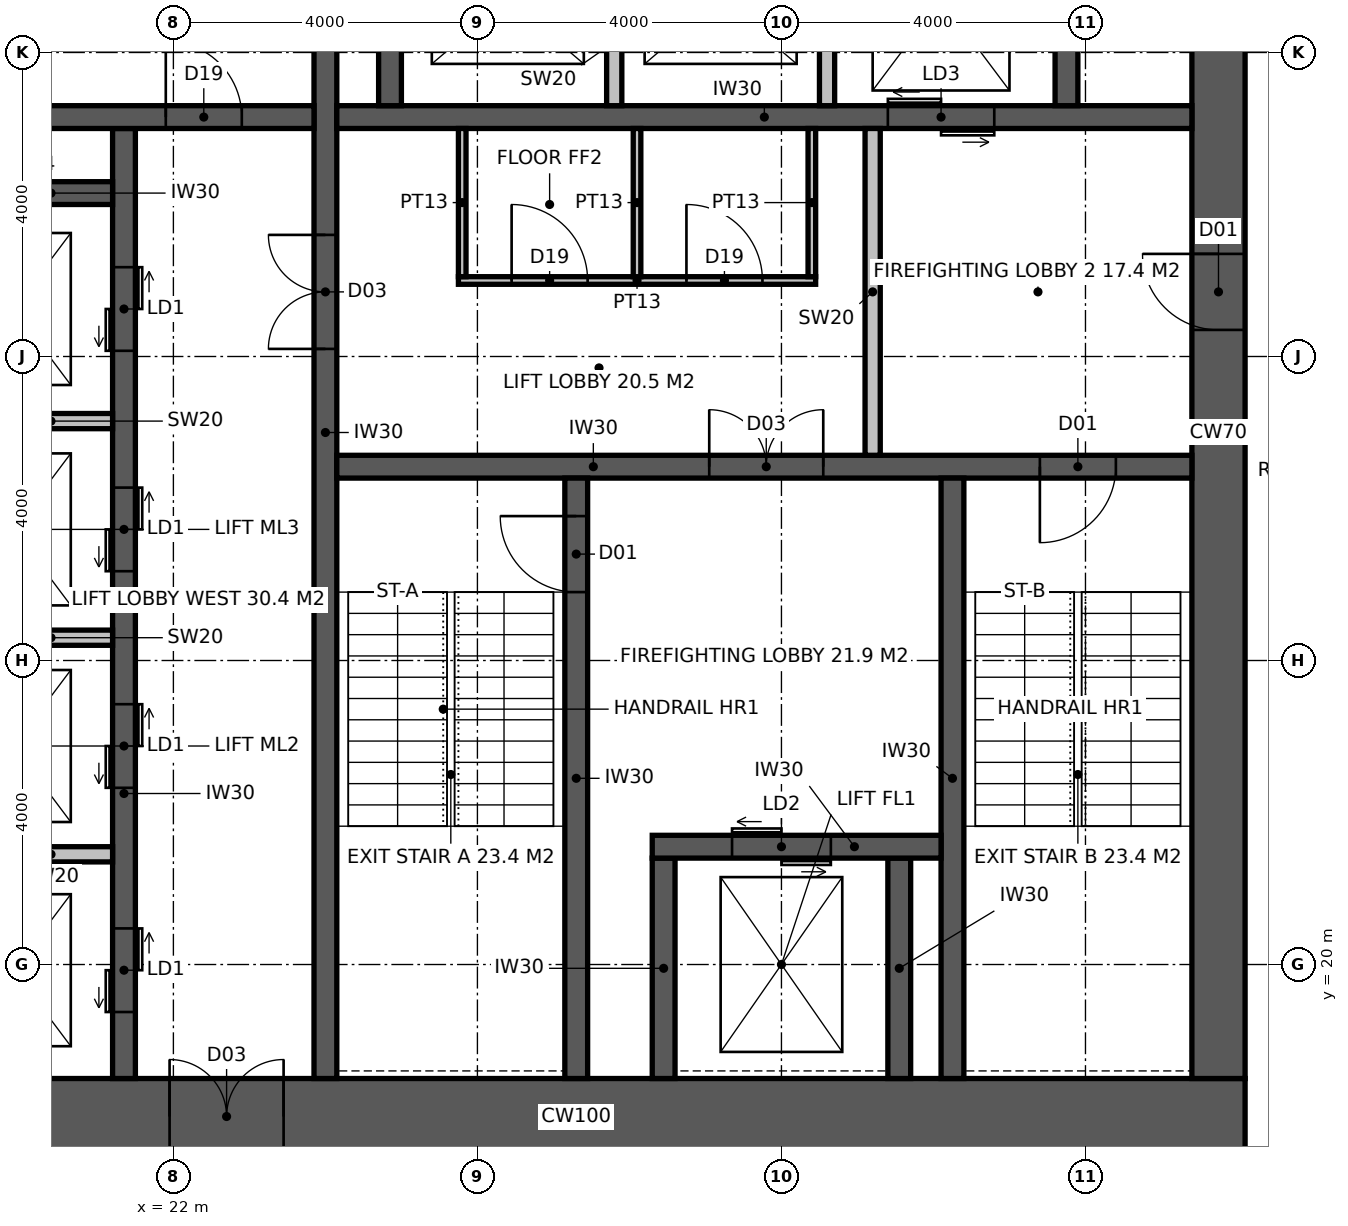
"""IFC4 building model, lengths in metres.
Left out: names, types, materials, properties, quantities, classifications, styles, units other than length and angle.
Written with IfcOpenShell. Run it as: python <this file> out.ifc"""

import sys

from ifc_helpers import new_model, si_unit, direction, frame, frame_2d, origin, place, context, subcontext, project, spatial, rectangle, extrude, element, fill, save


model = new_model("IFC4")
c1 = context("Model", 3, precision=1e-05, world=origin(), true_north=direction((0.0, 1.0)))
c2 = subcontext(c1, "Body", "Model", "MODEL_VIEW")
j1 = project(units=[si_unit("LENGTHUNIT", "METRE"), si_unit("PLANEANGLEUNIT", "RADIAN")], contexts=[c1])
p1 = place(None, origin())
s1 = spatial("IfcSite", under=j1, at=p1, CompositionType="ELEMENT")
p2 = place(p1, origin())
s2 = spatial("IfcBuilding", under=s1, at=p2, CompositionType="ELEMENT")
p3 = place(p2, frame((0.0, 0.0, 93.4)))
s3 = spatial("IfcBuildingStorey", under=s2, at=p3, CompositionType="ELEMENT", Elevation=93.4)
p4 = place(p3, frame((18.5, 18.0, -0.15), z_axis=(0.0, 0.0, 1.0), x_axis=(1.0, 0.0, 0.0)))
e1 = element("IfcWall", 1, at=p4, inside=s3, PredefinedType="SHEAR", context=c2, shape_type="SweptSolid", body=[
    extrude(rectangle(XDim=17.6, YDim=1.0, at=frame_2d((8.8, 0.0))), origin(), (0.0, 0.0, 1.0), 4.0),
])
p5 = place(p4, frame((3.45, 0.0, 0.15)))
e2 = element("IfcOpeningElement", 2, at=p5, cuts=e1, PredefinedType="OPENING", context=c2, shape_type="SweptSolid", body=[
    extrude(rectangle(XDim=1.5, YDim=2.4, at=frame_2d((0.75, 1.2))), frame((0.0, 0.51, 0.0), z_axis=(0.0, -1.0, 0.0), x_axis=(1.0, 0.0, 0.0)), (0.0, 0.0, 1.0), 1.02),
])
p6 = place(p3, frame((35.75, 18.5, -0.15), z_axis=(0.0, 0.0, 1.0), x_axis=(0.0, 1.0, 0.0)))
e3 = element("IfcWall", 3, at=p6, inside=s3, PredefinedType="SHEAR", context=c2, shape_type="SweptSolid", body=[
    extrude(rectangle(XDim=17.0, YDim=0.7, at=frame_2d((8.5, 0.0))), origin(), (0.0, 0.0, 1.0), 4.0),
])
p7 = place(p6, frame((9.85, 0.0, 0.15)))
e4 = element("IfcOpeningElement", 4, at=p7, cuts=e3, PredefinedType="OPENING", context=c2, shape_type="SweptSolid", body=[
    extrude(rectangle(XDim=1.0, YDim=2.2, at=frame_2d((0.5, 1.1))), frame((0.0, 0.36, 0.0), z_axis=(0.0, -1.0, 0.0), x_axis=(1.0, 0.0, 0.0)), (0.0, 0.0, 1.0), 0.72),
])
p8 = place(p3, frame((24.0, 18.5, -0.15), z_axis=(0.0, 0.0, 1.0), x_axis=(0.0, 1.0, 0.0)))
e5 = element("IfcWall", 5, at=p8, inside=s3, PredefinedType="SHEAR", context=c2, shape_type="SweptSolid", body=[
    extrude(rectangle(XDim=17.0, YDim=0.3, at=frame_2d((8.5, 0.0))), origin(), (0.0, 0.0, 1.0), 4.0),
])
p9 = place(p8, frame((9.6, 0.0, 0.15)))
e6 = element("IfcOpeningElement", 6, at=p9, cuts=e5, PredefinedType="OPENING", context=c2, shape_type="SweptSolid", body=[
    extrude(rectangle(XDim=1.5, YDim=2.4, at=frame_2d((0.75, 1.2))), frame((0.0, 0.16, 0.0), z_axis=(0.0, -1.0, 0.0), x_axis=(1.0, 0.0, 0.0)), (0.0, 0.0, 1.0), 0.32),
])
p10 = place(p3, frame((24.15, 26.55, -0.15), z_axis=(0.0, 0.0, 1.0), x_axis=(1.0, 0.0, 0.0)))
e7 = element("IfcWall", 7, at=p10, inside=s3, PredefinedType="SHEAR", context=c2, shape_type="SweptSolid", body=[
    extrude(rectangle(XDim=11.25, YDim=0.3, at=frame_2d((5.625, 0.0))), origin(), (0.0, 0.0, 1.0), 4.0),
])
p11 = place(p10, frame((9.25, 0.0, 0.15)))
e8 = element("IfcOpeningElement", 8, at=p11, cuts=e7, PredefinedType="OPENING", context=c2, shape_type="SweptSolid", body=[
    extrude(rectangle(XDim=1.0, YDim=2.2, at=frame_2d((0.5, 1.1))), frame((0.0, 0.16, 0.0), z_axis=(0.0, -1.0, 0.0), x_axis=(1.0, 0.0, 0.0)), (0.0, 0.0, 1.0), 0.32),
])
p12 = place(p10, frame((4.9, 0.0, 0.15)))
e9 = element("IfcOpeningElement", 9, at=p12, cuts=e7, PredefinedType="OPENING", context=c2, shape_type="SweptSolid", body=[
    extrude(rectangle(XDim=1.5, YDim=2.4, at=frame_2d((0.75, 1.2))), frame((0.0, 0.16, 0.0), z_axis=(0.0, -1.0, 0.0), x_axis=(1.0, 0.0, 0.0)), (0.0, 0.0, 1.0), 0.32),
])
p13 = place(p3, frame((27.3, 18.5, -0.15), z_axis=(0.0, 0.0, 1.0), x_axis=(0.0, 1.0, 0.0)))
e10 = element("IfcWall", 10, at=p13, inside=s3, PredefinedType="SHEAR", context=c2, shape_type="SweptSolid", body=[
    extrude(rectangle(XDim=7.9, YDim=0.3, at=frame_2d((3.95, 0.0))), origin(), (0.0, 0.0, 1.0), 4.0),
])
p14 = place(p13, frame((6.4, 0.0, 0.15)))
e11 = element("IfcOpeningElement", 11, at=p14, cuts=e10, PredefinedType="OPENING", context=c2, shape_type="SweptSolid", body=[
    extrude(rectangle(XDim=1.0, YDim=2.2, at=frame_2d((0.5, 1.1))), frame((0.0, 0.16, 0.0), z_axis=(0.0, -1.0, 0.0), x_axis=(1.0, 0.0, 0.0)), (0.0, 0.0, 1.0), 0.32),
])
p15 = place(p3, frame((32.25, 18.5, -0.15), z_axis=(0.0, 0.0, 1.0), x_axis=(0.0, 1.0, 0.0)))
e12 = element("IfcWall", 12, at=p15, inside=s3, PredefinedType="SHEAR", context=c2, shape_type="SweptSolid", body=[
    extrude(rectangle(XDim=7.9, YDim=0.3, at=frame_2d((3.95, 0.0))), origin(), (0.0, 0.0, 1.0), 4.0),
])
for number, where, z_axis, x_axis in (
    (13, (28.45, 18.5, -0.15), (0.0, 0.0, 1.0), (0.0, 1.0, 0.0)),
    (14, (31.55, 18.5, -0.15), (0.0, 0.0, 1.0), (0.0, 1.0, 0.0)),
):
    element("IfcWall", number, at=place(p3, frame(where, z_axis=z_axis, x_axis=x_axis)), inside=s3, PredefinedType="SHEAR", context=c2, shape_type="SweptSolid", body=[
        extrude(rectangle(XDim=2.9, YDim=0.3, at=frame_2d((1.45, 0.0))), origin(), (0.0, 0.0, 1.0), 4.0),
    ])
p16 = place(p3, frame((28.3, 21.55, -0.15), z_axis=(0.0, 0.0, 1.0), x_axis=(1.0, 0.0, 0.0)))
e15 = element("IfcWall", 15, at=p16, inside=s3, PredefinedType="SHEAR", context=c2, shape_type="SweptSolid", body=[
    extrude(rectangle(XDim=3.8, YDim=0.3, at=frame_2d((1.9, 0.0))), origin(), (0.0, 0.0, 1.0), 4.0),
])
p17 = place(p16, frame((1.05, 0.0, 0.15)))
e16 = element("IfcOpeningElement", 16, at=p17, cuts=e15, PredefinedType="OPENING", context=c2, shape_type="SweptSolid", body=[
    extrude(rectangle(XDim=1.3, YDim=2.4, at=frame_2d((0.65, 1.2))), frame((0.0, 0.16, 0.0), z_axis=(0.0, -1.0, 0.0), x_axis=(1.0, 0.0, 0.0)), (0.0, 0.0, 1.0), 0.32),
])
p18 = place(p3, frame((24.15, 31.15, -0.15), z_axis=(0.0, 0.0, 1.0), x_axis=(1.0, 0.0, 0.0)))
e17 = element("IfcWall", 17, at=p18, inside=s3, PredefinedType="SHEAR", context=c2, shape_type="SweptSolid", body=[
    extrude(rectangle(XDim=11.25, YDim=0.3, at=frame_2d((5.625, 0.0))), origin(), (0.0, 0.0, 1.0), 4.0),
])
p19 = place(p18, frame((7.25, 0.0, 0.15)))
e18 = element("IfcOpeningElement", 18, at=p19, cuts=e17, PredefinedType="OPENING", context=c2, shape_type="SweptSolid", body=[
    extrude(rectangle(XDim=1.4, YDim=2.4, at=frame_2d((0.7, 1.2))), frame((0.0, 0.16, 0.0), z_axis=(0.0, -1.0, 0.0), x_axis=(1.0, 0.0, 0.0)), (0.0, 0.0, 1.0), 0.32),
])
p20 = place(p3, frame((21.35, 18.5, -0.15), z_axis=(0.0, 0.0, 1.0), x_axis=(0.0, 1.0, 0.0)))
e19 = element("IfcWall", 19, at=p20, inside=s3, PredefinedType="SHEAR", context=c2, shape_type="SweptSolid", body=[
    extrude(rectangle(XDim=12.5, YDim=0.3, at=frame_2d((6.25, 0.0))), origin(), (0.0, 0.0, 1.0), 4.0),
])
p21 = place(p20, frame((0.875, 0.0, 0.15)))
e20 = element("IfcOpeningElement", 20, at=p21, cuts=e19, PredefinedType="OPENING", context=c2, shape_type="SweptSolid", body=[
    extrude(rectangle(XDim=1.1, YDim=2.2, at=frame_2d((0.55, 1.1))), frame((0.0, 0.16, 0.0), z_axis=(0.0, -1.0, 0.0), x_axis=(1.0, 0.0, 0.0)), (0.0, 0.0, 1.0), 0.32),
])
p22 = place(p20, frame((3.825, 0.0, 0.15)))
e21 = element("IfcOpeningElement", 21, at=p22, cuts=e19, PredefinedType="OPENING", context=c2, shape_type="SweptSolid", body=[
    extrude(rectangle(XDim=1.1, YDim=2.2, at=frame_2d((0.55, 1.1))), frame((0.0, 0.16, 0.0), z_axis=(0.0, -1.0, 0.0), x_axis=(1.0, 0.0, 0.0)), (0.0, 0.0, 1.0), 0.32),
])
p23 = place(p20, frame((6.675, 0.0, 0.15)))
e22 = element("IfcOpeningElement", 22, at=p23, cuts=e19, PredefinedType="OPENING", context=c2, shape_type="SweptSolid", body=[
    extrude(rectangle(XDim=1.1, YDim=2.2, at=frame_2d((0.55, 1.1))), frame((0.0, 0.16, 0.0), z_axis=(0.0, -1.0, 0.0), x_axis=(1.0, 0.0, 0.0)), (0.0, 0.0, 1.0), 0.32),
])
p24 = place(p20, frame((9.575, 0.0, 0.15)))
e23 = element("IfcOpeningElement", 23, at=p24, cuts=e19, PredefinedType="OPENING", context=c2, shape_type="SweptSolid", body=[
    extrude(rectangle(XDim=1.1, YDim=2.2, at=frame_2d((0.55, 1.1))), frame((0.0, 0.16, 0.0), z_axis=(0.0, -1.0, 0.0), x_axis=(1.0, 0.0, 0.0)), (0.0, 0.0, 1.0), 0.32),
])
p25 = place(p3, frame((18.5, 31.15, -0.15), z_axis=(0.0, 0.0, 1.0), x_axis=(1.0, 0.0, 0.0)))
e24 = element("IfcWall", 24, at=p25, inside=s3, PredefinedType="SHEAR", context=c2, shape_type="SweptSolid", body=[
    extrude(rectangle(XDim=5.35, YDim=0.3, at=frame_2d((2.675, 0.0))), origin(), (0.0, 0.0, 1.0), 4.0),
])
p26 = place(p25, frame((3.4, 0.0, 0.15)))
e25 = element("IfcOpeningElement", 25, at=p26, cuts=e24, PredefinedType="OPENING", context=c2, shape_type="SweptSolid", body=[
    extrude(rectangle(XDim=1.0, YDim=2.2, at=frame_2d((0.5, 1.1))), frame((0.0, 0.16, 0.0), z_axis=(0.0, -1.0, 0.0), x_axis=(1.0, 0.0, 0.0)), (0.0, 0.0, 1.0), 0.32),
])
p27 = place(p3, frame((18.5, 30.15, -0.15), z_axis=(0.0, 0.0, 1.0), x_axis=(1.0, 0.0, 0.0)))
e26 = element("IfcWall", 26, at=p27, inside=s3, PredefinedType="SHEAR", context=c2, shape_type="SweptSolid", body=[
    extrude(rectangle(XDim=2.7, YDim=0.3, at=frame_2d((1.35, 0.0))), origin(), (0.0, 0.0, 1.0), 4.0),
])
for number, where, z_axis, x_axis in (
    (27, (24.85, 31.3, -0.15), (0.0, 0.0, 1.0), (0.0, 1.0, 0.0)),
    (28, (33.75, 31.3, -0.15), (0.0, 0.0, 1.0), (0.0, 1.0, 0.0)),
):
    element("IfcWall", number, at=place(p3, frame(where, z_axis=z_axis, x_axis=x_axis)), inside=s3, PredefinedType="SHEAR", context=c2, shape_type="SweptSolid", body=[
        extrude(rectangle(XDim=4.2, YDim=0.3, at=frame_2d((2.1, 0.0))), origin(), (0.0, 0.0, 1.0), 4.0),
    ])
for number, where, z_axis, x_axis in (
    (29, (27.8, 31.3, -0.15), (0.0, 0.0, 1.0), (0.0, 1.0, 0.0)),
    (30, (30.6, 31.3, -0.15), (0.0, 0.0, 1.0), (0.0, 1.0, 0.0)),
):
    element("IfcWall", number, at=place(p3, frame(where, z_axis=z_axis, x_axis=x_axis)), inside=s3, PredefinedType="SOLIDWALL", context=c2, shape_type="SweptSolid", body=[
        extrude(rectangle(XDim=2.8, YDim=0.2, at=frame_2d((1.4, 0.0))), origin(), (0.0, 0.0, 1.0), 4.0),
    ])
for number, where, z_axis, x_axis in (
    (31, (18.5, 21.45, -0.15), (0.0, 0.0, 1.0), (1.0, 0.0, 0.0)),
    (32, (18.5, 24.3, -0.15), (0.0, 0.0, 1.0), (1.0, 0.0, 0.0)),
    (33, (18.5, 27.15, -0.15), (0.0, 0.0, 1.0), (1.0, 0.0, 0.0)),
):
    element("IfcWall", number, at=place(p3, frame(where, z_axis=z_axis, x_axis=x_axis)), inside=s3, PredefinedType="SOLIDWALL", context=c2, shape_type="SweptSolid", body=[
        extrude(rectangle(XDim=2.7, YDim=0.2, at=frame_2d((1.35, 0.0))), origin(), (0.0, 0.0, 1.0), 4.0),
    ])
p28 = place(p3, frame((31.2, 26.7, 0.0), z_axis=(0.0, 0.0, 1.0), x_axis=(0.0, 1.0, 0.0)))
e34 = element("IfcWall", 34, at=p28, inside=s3, PredefinedType="SOLIDWALL", context=c2, shape_type="SweptSolid", body=[
    extrude(rectangle(XDim=4.3, YDim=0.2, at=frame_2d((2.15, 0.0))), origin(), (0.0, 0.0, 1.0), 3.85),
])
p29 = place(p3, frame((25.75, 29.0, 0.0), z_axis=(0.0, 0.0, 1.0), x_axis=(1.0, 0.0, 0.0)))
e35 = element("IfcWall", 35, at=p29, inside=s3, PredefinedType="PARTITIONING", context=c2, shape_type="SweptSolid", body=[
    extrude(rectangle(XDim=4.7, YDim=0.1, at=frame_2d((2.35, 0.0))), origin(), (0.0, 0.0, 1.0), 3.85),
])
p30 = place(p29, frame((0.7, 0.0, 0.0)))
e36 = element("IfcOpeningElement", 36, at=p30, cuts=e35, PredefinedType="OPENING", context=c2, shape_type="SweptSolid", body=[
    extrude(rectangle(XDim=1.0, YDim=2.2, at=frame_2d((0.5, 1.1))), frame((0.0, 0.06, 0.0), z_axis=(0.0, -1.0, 0.0), x_axis=(1.0, 0.0, 0.0)), (0.0, 0.0, 1.0), 0.12),
])
p31 = place(p29, frame((3.0, 0.0, 0.0)))
e37 = element("IfcOpeningElement", 37, at=p31, cuts=e35, PredefinedType="OPENING", context=c2, shape_type="SweptSolid", body=[
    extrude(rectangle(XDim=1.0, YDim=2.2, at=frame_2d((0.5, 1.1))), frame((0.0, 0.06, 0.0), z_axis=(0.0, -1.0, 0.0), x_axis=(1.0, 0.0, 0.0)), (0.0, 0.0, 1.0), 0.12),
])
for number, where, z_axis, x_axis in (
    (38, (25.8, 29.05, 0.0), (0.0, 0.0, 1.0), (0.0, 1.0, 0.0)),
    (39, (30.4, 29.05, 0.0), (0.0, 0.0, 1.0), (0.0, 1.0, 0.0)),
    (40, (28.1, 29.05, 0.0), (0.0, 0.0, 1.0), (0.0, 1.0, 0.0)),
):
    element("IfcWall", number, at=place(p3, frame(where, z_axis=z_axis, x_axis=x_axis)), inside=s3, PredefinedType="PARTITIONING", context=c2, shape_type="SweptSolid", body=[
        extrude(rectangle(XDim=1.95, YDim=0.1, at=frame_2d((0.975, 0.0))), origin(), (0.0, 0.0, 1.0), 3.85),
    ])
p32 = place(p14, origin())
e41 = element("IfcDoor", 41, at=p32, inside=s3, OperationType="SINGLE_SWING_RIGHT", PredefinedType="DOOR", context=c2, shape_type="SweptSolid", body=[
    extrude(rectangle(XDim=1.0, YDim=2.2, at=frame_2d((0.5, 1.1))), frame((0.0, 0.025, 0.0), z_axis=(0.0, -1.0, 0.0), x_axis=(1.0, 0.0, 0.0)), (0.0, 0.0, 1.0), 0.05),
])
fill(e11, e41)
p33 = place(p11, frame((1.0, 0.0, 0.0), z_axis=(0.0, 0.0, 1.0), x_axis=(-1.0, 0.0, 0.0)))
e42 = element("IfcDoor", 42, at=p33, inside=s3, OperationType="SINGLE_SWING_RIGHT", PredefinedType="DOOR", context=c2, shape_type="SweptSolid", body=[
    extrude(rectangle(XDim=1.0, YDim=2.2, at=frame_2d((0.5, 1.1))), frame((0.0, 0.025, 0.0), z_axis=(0.0, -1.0, 0.0), x_axis=(1.0, 0.0, 0.0)), (0.0, 0.0, 1.0), 0.05),
])
fill(e8, e42)
p34 = place(p7, origin())
e43 = element("IfcDoor", 43, at=p34, inside=s3, OperationType="SINGLE_SWING_RIGHT", PredefinedType="DOOR", context=c2, shape_type="SweptSolid", body=[
    extrude(rectangle(XDim=1.0, YDim=2.2, at=frame_2d((0.5, 1.1))), frame((0.0, 0.025, 0.0), z_axis=(0.0, -1.0, 0.0), x_axis=(1.0, 0.0, 0.0)), (0.0, 0.0, 1.0), 0.05),
])
fill(e4, e43)
p35 = place(p12, origin())
e44 = element("IfcDoor", 44, at=p35, inside=s3, OperationType="DOUBLE_DOOR_DOUBLE_SWING", PredefinedType="DOOR", context=c2, shape_type="SweptSolid", body=[
    extrude(rectangle(XDim=1.5, YDim=2.4, at=frame_2d((0.75, 1.2))), frame((0.0, 0.025, 0.0), z_axis=(0.0, -1.0, 0.0), x_axis=(1.0, 0.0, 0.0)), (0.0, 0.0, 1.0), 0.05),
])
fill(e9, e44)
p36 = place(p9, origin())
e45 = element("IfcDoor", 45, at=p36, inside=s3, OperationType="DOUBLE_DOOR_DOUBLE_SWING", PredefinedType="DOOR", context=c2, shape_type="SweptSolid", body=[
    extrude(rectangle(XDim=1.5, YDim=2.4, at=frame_2d((0.75, 1.2))), frame((0.0, 0.025, 0.0), z_axis=(0.0, -1.0, 0.0), x_axis=(1.0, 0.0, 0.0)), (0.0, 0.0, 1.0), 0.05),
])
fill(e6, e45)
p37 = place(p26, origin())
e46 = element("IfcDoor", 46, at=p37, inside=s3, OperationType="SINGLE_SWING_LEFT", PredefinedType="DOOR", context=c2, shape_type="SweptSolid", body=[
    extrude(rectangle(XDim=1.0, YDim=2.2, at=frame_2d((0.5, 1.1))), frame((0.0, 0.025, 0.0), z_axis=(0.0, -1.0, 0.0), x_axis=(1.0, 0.0, 0.0)), (0.0, 0.0, 1.0), 0.05),
])
fill(e25, e46)
p38 = place(p30, origin())
e47 = element("IfcDoor", 47, at=p38, inside=s3, OperationType="SINGLE_SWING_LEFT", PredefinedType="DOOR", context=c2, shape_type="SweptSolid", body=[
    extrude(rectangle(XDim=1.0, YDim=2.2, at=frame_2d((0.5, 1.1))), frame((0.0, 0.025, 0.0), z_axis=(0.0, -1.0, 0.0), x_axis=(1.0, 0.0, 0.0)), (0.0, 0.0, 1.0), 0.05),
])
fill(e36, e47)
p39 = place(p31, origin())
e48 = element("IfcDoor", 48, at=p39, inside=s3, OperationType="SINGLE_SWING_LEFT", PredefinedType="DOOR", context=c2, shape_type="SweptSolid", body=[
    extrude(rectangle(XDim=1.0, YDim=2.2, at=frame_2d((0.5, 1.1))), frame((0.0, 0.025, 0.0), z_axis=(0.0, -1.0, 0.0), x_axis=(1.0, 0.0, 0.0)), (0.0, 0.0, 1.0), 0.05),
])
fill(e37, e48)
p40 = place(p5, origin())
e49 = element("IfcDoor", 49, at=p40, inside=s3, OperationType="DOUBLE_DOOR_DOUBLE_SWING", PredefinedType="DOOR", context=c2, shape_type="SweptSolid", body=[
    extrude(rectangle(XDim=1.5, YDim=2.4, at=frame_2d((0.75, 1.2))), frame((0.0, 0.025, 0.0), z_axis=(0.0, -1.0, 0.0), x_axis=(1.0, 0.0, 0.0)), (0.0, 0.0, 1.0), 0.05),
])
fill(e2, e49)
p41 = place(p17, origin())
e50 = element("IfcDoor", 50, at=p41, inside=s3, OperationType="DOUBLE_DOOR_SLIDING", PredefinedType="DOOR", context=c2, shape_type="SweptSolid", body=[
    extrude(rectangle(XDim=1.3, YDim=2.4, at=frame_2d((0.65, 1.2))), frame((0.0, 0.025, 0.0), z_axis=(0.0, -1.0, 0.0), x_axis=(1.0, 0.0, 0.0)), (0.0, 0.0, 1.0), 0.05),
])
fill(e16, e50)
p42 = place(p19, origin())
e51 = element("IfcDoor", 51, at=p42, inside=s3, OperationType="DOUBLE_DOOR_SLIDING", PredefinedType="DOOR", context=c2, shape_type="SweptSolid", body=[
    extrude(rectangle(XDim=1.4, YDim=2.4, at=frame_2d((0.7, 1.2))), frame((0.0, 0.025, 0.0), z_axis=(0.0, -1.0, 0.0), x_axis=(1.0, 0.0, 0.0)), (0.0, 0.0, 1.0), 0.05),
])
fill(e18, e51)
p43 = place(p21, origin())
e52 = element("IfcDoor", 52, at=p43, inside=s3, OperationType="DOUBLE_DOOR_SLIDING", PredefinedType="DOOR", context=c2, shape_type="SweptSolid", body=[
    extrude(rectangle(XDim=1.1, YDim=2.2, at=frame_2d((0.55, 1.1))), frame((0.0, 0.025, 0.0), z_axis=(0.0, -1.0, 0.0), x_axis=(1.0, 0.0, 0.0)), (0.0, 0.0, 1.0), 0.05),
])
fill(e20, e52)
p44 = place(p22, origin())
e53 = element("IfcDoor", 53, at=p44, inside=s3, OperationType="DOUBLE_DOOR_SLIDING", PredefinedType="DOOR", context=c2, shape_type="SweptSolid", body=[
    extrude(rectangle(XDim=1.1, YDim=2.2, at=frame_2d((0.55, 1.1))), frame((0.0, 0.025, 0.0), z_axis=(0.0, -1.0, 0.0), x_axis=(1.0, 0.0, 0.0)), (0.0, 0.0, 1.0), 0.05),
])
fill(e21, e53)
p45 = place(p23, origin())
e54 = element("IfcDoor", 54, at=p45, inside=s3, OperationType="DOUBLE_DOOR_SLIDING", PredefinedType="DOOR", context=c2, shape_type="SweptSolid", body=[
    extrude(rectangle(XDim=1.1, YDim=2.2, at=frame_2d((0.55, 1.1))), frame((0.0, 0.025, 0.0), z_axis=(0.0, -1.0, 0.0), x_axis=(1.0, 0.0, 0.0)), (0.0, 0.0, 1.0), 0.05),
])
fill(e22, e54)
p46 = place(p24, origin())
e55 = element("IfcDoor", 55, at=p46, inside=s3, OperationType="DOUBLE_DOOR_SLIDING", PredefinedType="DOOR", context=c2, shape_type="SweptSolid", body=[
    extrude(rectangle(XDim=1.1, YDim=2.2, at=frame_2d((0.55, 1.1))), frame((0.0, 0.025, 0.0), z_axis=(0.0, -1.0, 0.0), x_axis=(1.0, 0.0, 0.0)), (0.0, 0.0, 1.0), 0.05),
])
fill(e23, e55)
save(model, sys.argv[1])
